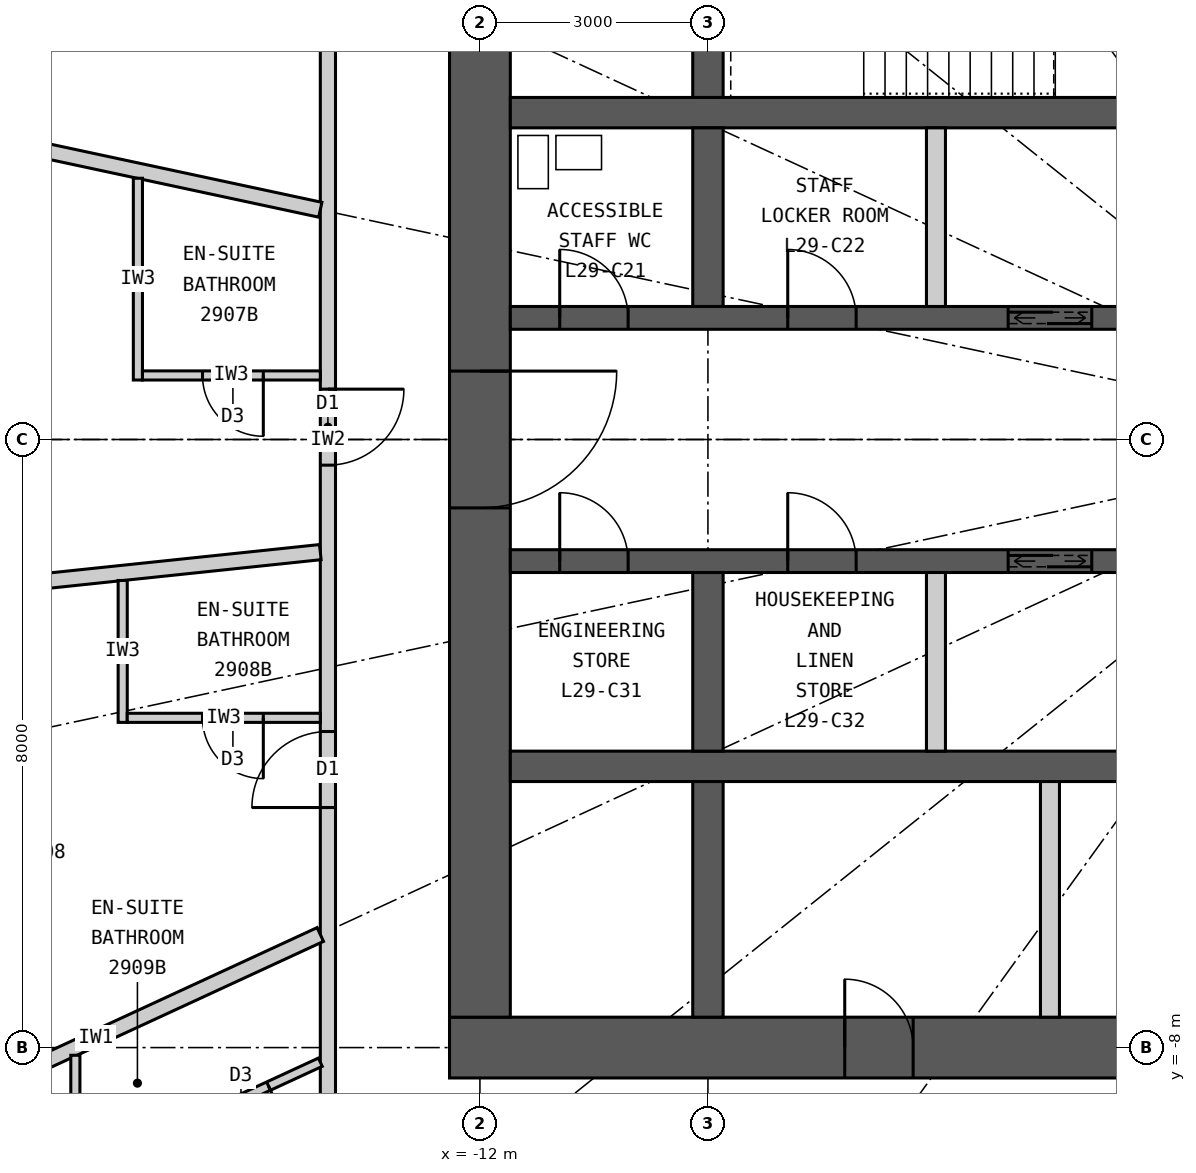
"""IFC4 building model, lengths in metres.
Left out: names, types, materials, properties, quantities, classifications, styles, units other than length and angle.
Written with IfcOpenShell. Run it as: python <this file> out.ifc"""

import sys

from ifc_helpers import new_model, si_unit, direction, frame, frame_2d, origin, place, context, subcontext, project, spatial, rectangle, extrude, element, fill, save


model = new_model("IFC4")
c1 = context("Model", 3, precision=1e-05, world=origin(), true_north=direction((0.0, 1.0)))
c2 = subcontext(c1, "Body", "Model", "MODEL_VIEW")
j1 = project(units=[si_unit("LENGTHUNIT", "METRE"), si_unit("PLANEANGLEUNIT", "RADIAN")], contexts=[c1])
p1 = place(None, origin())
s1 = spatial("IfcSite", under=j1, at=p1, CompositionType="ELEMENT")
p2 = place(p1, origin())
s2 = spatial("IfcBuilding", under=s1, at=p2, CompositionType="ELEMENT")
p3 = place(p2, frame((0.0, 0.0, 115.5)))
s3 = spatial("IfcBuildingStorey", under=s2, at=p3, CompositionType="ELEMENT", Elevation=115.5)
p4 = place(p3, frame((12.4, -8.0, 0.0), z_axis=(0.0, 0.0, 1.0), x_axis=(-1.0, 0.0, 0.0)))
e1 = element("IfcWall", 1, at=p4, inside=s3, PredefinedType="SHEAR", context=c2, shape_type="SweptSolid", body=[
    extrude(rectangle(XDim=24.8, YDim=0.8, at=frame_2d((12.4, 0.0))), origin(), (0.0, 0.0, 1.0), 3.3),
])
p5 = place(p4, frame((11.1, 0.0, 0.0)))
e2 = element("IfcOpeningElement", 2, at=p5, cuts=e1, PredefinedType="OPENING", context=c2, shape_type="SweptSolid", body=[
    extrude(rectangle(XDim=1.2, YDim=2.2, at=frame_2d((0.6, 1.1))), frame((0.0, 0.41, 0.0), z_axis=(0.0, -1.0, 0.0), x_axis=(1.0, 0.0, 0.0)), (0.0, 0.0, 1.0), 0.82),
])
p6 = place(p4, frame((18.7, 0.0, 0.0)))
e3 = element("IfcOpeningElement", 3, at=p6, cuts=e1, PredefinedType="OPENING", context=c2, shape_type="SweptSolid", body=[
    extrude(rectangle(XDim=0.9, YDim=2.2, at=frame_2d((0.45, 1.1))), frame((0.0, 0.41, 0.0), z_axis=(0.0, -1.0, 0.0), x_axis=(1.0, 0.0, 0.0)), (0.0, 0.0, 1.0), 0.82),
])
p7 = place(p3, frame((-12.0, 7.6, 0.0), z_axis=(0.0, 0.0, 1.0), x_axis=(0.0, -1.0, 0.0)))
e4 = element("IfcWall", 4, at=p7, inside=s3, PredefinedType="SHEAR", context=c2, shape_type="SweptSolid", body=[
    extrude(rectangle(XDim=15.2, YDim=0.8, at=frame_2d((7.6, 0.0))), origin(), (0.0, 0.0, 1.0), 3.3),
])
p8 = place(p7, frame((6.7, 0.0, 0.0)))
e5 = element("IfcOpeningElement", 5, at=p8, cuts=e4, PredefinedType="OPENING", context=c2, shape_type="SweptSolid", body=[
    extrude(rectangle(XDim=1.8, YDim=2.2, at=frame_2d((0.9, 1.1))), frame((0.0, 0.41, 0.0), z_axis=(0.0, -1.0, 0.0), x_axis=(1.0, 0.0, 0.0)), (0.0, 0.0, 1.0), 0.82),
])
p9 = place(p3, frame((-11.6, 4.3, 0.0), z_axis=(0.0, 0.0, 1.0), x_axis=(1.0, 0.0, 0.0)))
e6 = element("IfcWall", 6, at=p9, inside=s3, PredefinedType="SHEAR", context=c2, shape_type="SweptSolid", body=[
    extrude(rectangle(XDim=23.2, YDim=0.4, at=frame_2d((11.6, 0.0))), origin(), (0.0, 0.0, 1.0), 3.3),
])
p10 = place(p3, frame((-11.6, 1.6, 0.0), z_axis=(0.0, 0.0, 1.0), x_axis=(1.0, 0.0, 0.0)))
e7 = element("IfcWall", 7, at=p10, inside=s3, PredefinedType="SHEAR", context=c2, shape_type="SweptSolid", body=[
    extrude(rectangle(XDim=23.2, YDim=0.3, at=frame_2d((11.6, 0.0))), origin(), (0.0, 0.0, 1.0), 3.3),
])
p11 = place(p10, frame((6.55, 0.0, 0.0)))
e8 = element("IfcOpeningElement", 8, at=p11, cuts=e7, PredefinedType="OPENING", context=c2, shape_type="SweptSolid", body=[
    extrude(rectangle(XDim=1.1, YDim=2.2, at=frame_2d((0.55, 1.1))), frame((0.0, 0.16, 0.0), z_axis=(0.0, -1.0, 0.0), x_axis=(1.0, 0.0, 0.0)), (0.0, 0.0, 1.0), 0.32),
])
p12 = place(p10, frame((0.65, 0.0, 0.0)))
e9 = element("IfcOpeningElement", 9, at=p12, cuts=e7, PredefinedType="OPENING", context=c2, shape_type="SweptSolid", body=[
    extrude(rectangle(XDim=0.9, YDim=2.2, at=frame_2d((0.45, 1.1))), frame((0.0, 0.16, 0.0), z_axis=(0.0, -1.0, 0.0), x_axis=(1.0, 0.0, 0.0)), (0.0, 0.0, 1.0), 0.32),
])
p13 = place(p10, frame((3.65, 0.0, 0.0)))
e10 = element("IfcOpeningElement", 10, at=p13, cuts=e7, PredefinedType="OPENING", context=c2, shape_type="SweptSolid", body=[
    extrude(rectangle(XDim=0.9, YDim=2.2, at=frame_2d((0.45, 1.1))), frame((0.0, 0.16, 0.0), z_axis=(0.0, -1.0, 0.0), x_axis=(1.0, 0.0, 0.0)), (0.0, 0.0, 1.0), 0.32),
])
p14 = place(p10, frame((21.65, 0.0, 0.0)))
e11 = element("IfcOpeningElement", 11, at=p14, cuts=e7, PredefinedType="OPENING", context=c2, shape_type="SweptSolid", body=[
    extrude(rectangle(XDim=0.9, YDim=2.2, at=frame_2d((0.45, 1.1))), frame((0.0, 0.16, 0.0), z_axis=(0.0, -1.0, 0.0), x_axis=(1.0, 0.0, 0.0)), (0.0, 0.0, 1.0), 0.32),
])
p15 = place(p3, frame((-11.6, -4.3, 0.0), z_axis=(0.0, 0.0, 1.0), x_axis=(1.0, 0.0, 0.0)))
e12 = element("IfcWall", 12, at=p15, inside=s3, PredefinedType="SHEAR", context=c2, shape_type="SweptSolid", body=[
    extrude(rectangle(XDim=23.2, YDim=0.4, at=frame_2d((11.6, 0.0))), origin(), (0.0, 0.0, 1.0), 3.3),
])
p16 = place(p3, frame((-11.6, -1.6, 0.0), z_axis=(0.0, 0.0, 1.0), x_axis=(1.0, 0.0, 0.0)))
e13 = element("IfcWall", 13, at=p16, inside=s3, PredefinedType="SHEAR", context=c2, shape_type="SweptSolid", body=[
    extrude(rectangle(XDim=23.2, YDim=0.3, at=frame_2d((11.6, 0.0))), origin(), (0.0, 0.0, 1.0), 3.3),
])
p17 = place(p16, frame((6.55, 0.0, 0.0)))
e14 = element("IfcOpeningElement", 14, at=p17, cuts=e13, PredefinedType="OPENING", context=c2, shape_type="SweptSolid", body=[
    extrude(rectangle(XDim=1.1, YDim=2.2, at=frame_2d((0.55, 1.1))), frame((0.0, 0.16, 0.0), z_axis=(0.0, -1.0, 0.0), x_axis=(1.0, 0.0, 0.0)), (0.0, 0.0, 1.0), 0.32),
])
p18 = place(p16, frame((15.3, 0.0, 0.0)))
e15 = element("IfcOpeningElement", 15, at=p18, cuts=e13, PredefinedType="OPENING", context=c2, shape_type="SweptSolid", body=[
    extrude(rectangle(XDim=1.6, YDim=2.4, at=frame_2d((0.8, 1.2))), frame((0.0, 0.16, 0.0), z_axis=(0.0, -1.0, 0.0), x_axis=(1.0, 0.0, 0.0)), (0.0, 0.0, 1.0), 0.32),
])
p19 = place(p16, frame((0.65, 0.0, 0.0)))
e16 = element("IfcOpeningElement", 16, at=p19, cuts=e13, PredefinedType="OPENING", context=c2, shape_type="SweptSolid", body=[
    extrude(rectangle(XDim=0.9, YDim=2.2, at=frame_2d((0.45, 1.1))), frame((0.0, 0.16, 0.0), z_axis=(0.0, -1.0, 0.0), x_axis=(1.0, 0.0, 0.0)), (0.0, 0.0, 1.0), 0.32),
])
p20 = place(p16, frame((3.65, 0.0, 0.0)))
e17 = element("IfcOpeningElement", 17, at=p20, cuts=e13, PredefinedType="OPENING", context=c2, shape_type="SweptSolid", body=[
    extrude(rectangle(XDim=0.9, YDim=2.2, at=frame_2d((0.45, 1.1))), frame((0.0, 0.16, 0.0), z_axis=(0.0, -1.0, 0.0), x_axis=(1.0, 0.0, 0.0)), (0.0, 0.0, 1.0), 0.32),
])
p21 = place(p16, frame((21.65, 0.0, 0.0)))
e18 = element("IfcOpeningElement", 18, at=p21, cuts=e13, PredefinedType="OPENING", context=c2, shape_type="SweptSolid", body=[
    extrude(rectangle(XDim=0.9, YDim=2.2, at=frame_2d((0.45, 1.1))), frame((0.0, 0.16, 0.0), z_axis=(0.0, -1.0, 0.0), x_axis=(1.0, 0.0, 0.0)), (0.0, 0.0, 1.0), 0.32),
])
p22 = place(p3, frame((-9.0, 4.5, 0.0), z_axis=(0.0, 0.0, 1.0), x_axis=(0.0, 1.0, 0.0)))
e19 = element("IfcWall", 19, at=p22, inside=s3, PredefinedType="SHEAR", context=c2, shape_type="SweptSolid", body=[
    extrude(rectangle(XDim=3.1, YDim=0.4, at=frame_2d((1.55, 0.0))), origin(), (0.0, 0.0, 1.0), 3.3),
])
for number, where, z_axis, x_axis in (
    (20, (-9.0, 1.75, 0.0), (0.0, 0.0, 1.0), (0.0, 1.0, 0.0)),
    (21, (-9.0, -4.1, 0.0), (0.0, 0.0, 1.0), (0.0, 1.0, 0.0)),
):
    element("IfcWall", number, at=place(p3, frame(where, z_axis=z_axis, x_axis=x_axis)), inside=s3, PredefinedType="SHEAR", context=c2, shape_type="SweptSolid", body=[
        extrude(rectangle(XDim=2.35, YDim=0.4, at=frame_2d((1.175, 0.0))), origin(), (0.0, 0.0, 1.0), 3.3),
    ])
p23 = place(p3, frame((-9.0, -7.6, 0.0), z_axis=(0.0, 0.0, 1.0), x_axis=(0.0, 1.0, 0.0)))
e22 = element("IfcWall", 22, at=p23, inside=s3, PredefinedType="SHEAR", context=c2, shape_type="SweptSolid", body=[
    extrude(rectangle(XDim=3.1, YDim=0.4, at=frame_2d((1.55, 0.0))), origin(), (0.0, 0.0, 1.0), 3.3),
])
p24 = place(p3, frame((-4.5, -7.6, 0.0), z_axis=(0.0, 0.0, 1.0), x_axis=(0.0, 1.0, 0.0)))
e23 = element("IfcWall", 23, at=p24, inside=s3, PredefinedType="PARTITIONING", context=c2, shape_type="SweptSolid", body=[
    extrude(rectangle(XDim=3.1, YDim=0.25, at=frame_2d((1.55, 0.0))), origin(), (0.0, 0.0, 1.0), 3.3),
])
for number, where, z_axis, x_axis in (
    (24, (-6.0, 1.75, 0.0), (0.0, 0.0, 1.0), (0.0, 1.0, 0.0)),
    (25, (-6.0, -4.1, 0.0), (0.0, 0.0, 1.0), (0.0, 1.0, 0.0)),
):
    element("IfcWall", number, at=place(p3, frame(where, z_axis=z_axis, x_axis=x_axis)), inside=s3, PredefinedType="PARTITIONING", context=c2, shape_type="SweptSolid", body=[
        extrude(rectangle(XDim=2.35, YDim=0.25, at=frame_2d((1.175, 0.0))), origin(), (0.0, 0.0, 1.0), 3.3),
    ])
p25 = place(p3, frame((-14.0, 9.9, 0.0), z_axis=(0.0, 0.0, 1.0), x_axis=(0.0, -1.0, 0.0)))
e26 = element("IfcWall", 26, at=p25, inside=s3, PredefinedType="PARTITIONING", context=c2, shape_type="SweptSolid", body=[
    extrude(rectangle(XDim=19.8, YDim=0.2, at=frame_2d((9.9, 0.0))), origin(), (0.0, 0.0, 1.0), 3.12),
])
p26 = place(p25, frame((3.622, 0.0, 0.0)))
e27 = element("IfcOpeningElement", 27, at=p26, cuts=e26, PredefinedType="OPENING", context=c2, shape_type="SweptSolid", body=[
    extrude(rectangle(XDim=1.0, YDim=2.2, at=frame_2d((0.5, 1.1))), frame((0.0, 0.11, 0.0), z_axis=(0.0, -1.0, 0.0), x_axis=(1.0, 0.0, 0.0)), (0.0, 0.0, 1.0), 0.22),
])
p27 = place(p25, frame((9.238, 0.0, 0.0)))
e28 = element("IfcOpeningElement", 28, at=p27, cuts=e26, PredefinedType="OPENING", context=c2, shape_type="SweptSolid", body=[
    extrude(rectangle(XDim=1.0, YDim=2.2, at=frame_2d((0.5, 1.1))), frame((0.0, 0.11, 0.0), z_axis=(0.0, -1.0, 0.0), x_axis=(1.0, 0.0, 0.0)), (0.0, 0.0, 1.0), 0.22),
])
p28 = place(p25, frame((13.742, 0.0, 0.0)))
e29 = element("IfcOpeningElement", 29, at=p28, cuts=e26, PredefinedType="OPENING", context=c2, shape_type="SweptSolid", body=[
    extrude(rectangle(XDim=1.0, YDim=2.2, at=frame_2d((0.5, 1.1))), frame((0.0, 0.11, 0.0), z_axis=(0.0, -1.0, 0.0), x_axis=(1.0, 0.0, 0.0)), (0.0, 0.0, 1.0), 0.22),
])
p29 = place(p25, frame((18.698, 0.0, 0.0)))
e30 = element("IfcOpeningElement", 30, at=p29, cuts=e26, PredefinedType="OPENING", context=c2, shape_type="SweptSolid", body=[
    extrude(rectangle(XDim=1.0, YDim=2.2, at=frame_2d((0.5, 1.1))), frame((0.0, 0.11, 0.0), z_axis=(0.0, -1.0, 0.0), x_axis=(1.0, 0.0, 0.0)), (0.0, 0.0, 1.0), 0.22),
])
p30 = place(p3, frame((-14.1, 3.022, 0.0), z_axis=(0.0, 0.0, 1.0), x_axis=(-0.977783513367, 0.209617272638, 0.0)))
e31 = element("IfcWall", 31, at=p30, inside=s3, PredefinedType="PARTITIONING", context=c2, shape_type="SweptSolid", body=[
    extrude(rectangle(XDim=8.508, YDim=0.2, at=frame_2d((4.254, 0.0))), origin(), (0.0, 0.0, 1.0), 2.37),
])
p31 = place(p3, frame((-14.1, -1.482, 0.0), z_axis=(0.0, 0.0, 1.0), x_axis=(-0.994523202615, -0.104516024894, 0.0)))
e32 = element("IfcWall", 32, at=p31, inside=s3, PredefinedType="PARTITIONING", context=c2, shape_type="SweptSolid", body=[
    extrude(rectangle(XDim=10.091, YDim=0.2, at=frame_2d((5.045, 0.0))), origin(), (0.0, 0.0, 1.0), 2.47),
])
p32 = place(p3, frame((-14.1, -6.512, 0.0), z_axis=(0.0, 0.0, 1.0), x_axis=(-0.907833019998, -0.419331858797, 0.0)))
e33 = element("IfcWall", 33, at=p32, inside=s3, PredefinedType="PARTITIONING", context=c2, shape_type="SweptSolid", body=[
    extrude(rectangle(XDim=6.505, YDim=0.2, at=frame_2d((3.252, 0.0))), origin(), (0.0, 0.0, 1.0), 2.27),
])
p33 = place(p3, frame((-16.5, 3.437, 0.0), z_axis=(0.0, 0.0, 1.0), x_axis=(0.0, -1.0, 0.0)))
e34 = element("IfcWall", 34, at=p33, inside=s3, PredefinedType="PARTITIONING", context=c2, shape_type="SweptSolid", body=[
    extrude(rectangle(XDim=2.655, YDim=0.12, at=frame_2d((1.327, 0.0))), origin(), (0.0, 0.0, 1.0), 3.12),
])
p34 = place(p3, frame((-14.1, 0.843, 0.0), z_axis=(0.0, 0.0, 1.0), x_axis=(-1.0, 0.0, 0.0)))
e35 = element("IfcWall", 35, at=p34, inside=s3, PredefinedType="PARTITIONING", context=c2, shape_type="SweptSolid", body=[
    extrude(rectangle(XDim=2.34, YDim=0.12, at=frame_2d((1.17, 0.0))), origin(), (0.0, 0.0, 1.0), 3.12),
])
p35 = place(p34, frame((0.75, 0.0, 0.0)))
e36 = element("IfcOpeningElement", 36, at=p35, cuts=e35, PredefinedType="OPENING", context=c2, shape_type="SweptSolid", body=[
    extrude(rectangle(XDim=0.8, YDim=2.1, at=frame_2d((0.4, 1.05))), frame((0.0, 0.07, 0.0), z_axis=(0.0, -1.0, 0.0), x_axis=(1.0, 0.0, 0.0)), (0.0, 0.0, 1.0), 0.14),
])
p36 = place(p3, frame((-16.7, -1.855, 0.0), z_axis=(0.0, 0.0, 1.0), x_axis=(0.0, -1.0, 0.0)))
e37 = element("IfcWall", 37, at=p36, inside=s3, PredefinedType="PARTITIONING", context=c2, shape_type="SweptSolid", body=[
    extrude(rectangle(XDim=1.867, YDim=0.12, at=frame_2d((0.933, 0.0))), origin(), (0.0, 0.0, 1.0), 3.12),
])
p37 = place(p3, frame((-14.1, -3.662, 0.0), z_axis=(0.0, 0.0, 1.0), x_axis=(-1.0, 0.0, 0.0)))
e38 = element("IfcWall", 38, at=p37, inside=s3, PredefinedType="PARTITIONING", context=c2, shape_type="SweptSolid", body=[
    extrude(rectangle(XDim=2.54, YDim=0.12, at=frame_2d((1.27, 0.0))), origin(), (0.0, 0.0, 1.0), 2.37),
])
p38 = place(p37, frame((0.75, 0.0, 0.0)))
e39 = element("IfcOpeningElement", 39, at=p38, cuts=e38, PredefinedType="OPENING", context=c2, shape_type="SweptSolid", body=[
    extrude(rectangle(XDim=0.8, YDim=2.1, at=frame_2d((0.4, 1.05))), frame((0.0, 0.07, 0.0), z_axis=(0.0, -1.0, 0.0), x_axis=(1.0, 0.0, 0.0)), (0.0, 0.0, 1.0), 0.14),
])
p39 = place(p3, frame((-17.323, -8.101, 0.0), z_axis=(0.0, 0.0, 1.0), x_axis=(0.0, -1.0, 0.0)))
e40 = element("IfcWall", 40, at=p39, inside=s3, PredefinedType="PARTITIONING", context=c2, shape_type="SweptSolid", body=[
    extrude(rectangle(XDim=1.64, YDim=0.12, at=frame_2d((0.82, 0.0))), origin(), (0.0, 0.0, 1.0), 3.12),
])
p40 = place(p3, frame((-14.1, -8.193, 0.0), z_axis=(0.0, 0.0, 1.0), x_axis=(-0.907836493557, -0.419324338628, 0.0)))
e41 = element("IfcWall", 41, at=p40, inside=s3, PredefinedType="PARTITIONING", context=c2, shape_type="SweptSolid", body=[
    extrude(rectangle(XDim=3.49, YDim=0.12, at=frame_2d((1.745, 0.0))), origin(), (0.0, 0.0, 1.0), 3.12),
])
p41 = place(p40, frame((0.75, 0.0, 0.0)))
e42 = element("IfcOpeningElement", 42, at=p41, cuts=e41, PredefinedType="OPENING", context=c2, shape_type="SweptSolid", body=[
    extrude(rectangle(XDim=0.8, YDim=2.1, at=frame_2d((0.4, 1.05))), frame((0.0, 0.07, 0.0), z_axis=(0.0, -1.0, 0.0), x_axis=(1.0, 0.0, 0.0)), (0.0, 0.0, 1.0), 0.14),
])
p42 = place(p35, origin())
e43 = element("IfcDoor", 43, at=p42, inside=s3, OperationType="SINGLE_SWING_LEFT", PredefinedType="DOOR", context=c2, shape_type="SweptSolid", body=[
    extrude(rectangle(XDim=0.8, YDim=2.1, at=frame_2d((0.4, 1.05))), frame((0.0, 0.025, 0.0), z_axis=(0.0, -1.0, 0.0), x_axis=(1.0, 0.0, 0.0)), (0.0, 0.0, 1.0), 0.05),
])
fill(e36, e43)
p43 = place(p27, origin())
e44 = element("IfcDoor", 44, at=p43, inside=s3, OperationType="SINGLE_SWING_LEFT", PredefinedType="DOOR", context=c2, shape_type="SweptSolid", body=[
    extrude(rectangle(XDim=1.0, YDim=2.2, at=frame_2d((0.5, 1.1))), frame((0.0, 0.025, 0.0), z_axis=(0.0, -1.0, 0.0), x_axis=(1.0, 0.0, 0.0)), (0.0, 0.0, 1.0), 0.05),
])
fill(e28, e44)
p44 = place(p38, origin())
e45 = element("IfcDoor", 45, at=p44, inside=s3, OperationType="SINGLE_SWING_LEFT", PredefinedType="DOOR", context=c2, shape_type="SweptSolid", body=[
    extrude(rectangle(XDim=0.8, YDim=2.1, at=frame_2d((0.4, 1.05))), frame((0.0, 0.025, 0.0), z_axis=(0.0, -1.0, 0.0), x_axis=(1.0, 0.0, 0.0)), (0.0, 0.0, 1.0), 0.05),
])
fill(e39, e45)
p45 = place(p28, origin())
e46 = element("IfcDoor", 46, at=p45, inside=s3, OperationType="SINGLE_SWING_RIGHT", PredefinedType="DOOR", context=c2, shape_type="SweptSolid", body=[
    extrude(rectangle(XDim=1.0, YDim=2.2, at=frame_2d((0.5, 1.1))), frame((0.0, 0.025, 0.0), z_axis=(0.0, -1.0, 0.0), x_axis=(1.0, 0.0, 0.0)), (0.0, 0.0, 1.0), 0.05),
])
fill(e29, e46)
p46 = place(p41, origin())
e47 = element("IfcDoor", 47, at=p46, inside=s3, OperationType="SINGLE_SWING_LEFT", PredefinedType="DOOR", context=c2, shape_type="SweptSolid", body=[
    extrude(rectangle(XDim=0.8, YDim=2.1, at=frame_2d((0.4, 1.05))), frame((0.0, 0.025, 0.0), z_axis=(0.0, -1.0, 0.0), x_axis=(1.0, 0.0, 0.0)), (0.0, 0.0, 1.0), 0.05),
])
fill(e42, e47)
p47 = place(p6, origin())
e48 = element("IfcDoor", 48, at=p47, inside=s3, OperationType="SINGLE_SWING_RIGHT", PredefinedType="DOOR", context=c2, shape_type="SweptSolid", body=[
    extrude(rectangle(XDim=0.9, YDim=2.2, at=frame_2d((0.45, 1.1))), frame((0.0, 0.025, 0.0), z_axis=(0.0, -1.0, 0.0), x_axis=(1.0, 0.0, 0.0)), (0.0, 0.0, 1.0), 0.05),
])
fill(e3, e48)
p48 = place(p11, origin())
e49 = element("IfcDoor", 49, at=p48, inside=s3, OperationType="DOUBLE_DOOR_SLIDING", PredefinedType="DOOR", context=c2, shape_type="SweptSolid", body=[
    extrude(rectangle(XDim=1.1, YDim=2.2, at=frame_2d((0.55, 1.1))), frame((0.0, 0.025, 0.0), z_axis=(0.0, -1.0, 0.0), x_axis=(1.0, 0.0, 0.0)), (0.0, 0.0, 1.0), 0.05),
])
fill(e8, e49)
p49 = place(p17, origin())
e50 = element("IfcDoor", 50, at=p49, inside=s3, OperationType="DOUBLE_DOOR_SLIDING", PredefinedType="DOOR", context=c2, shape_type="SweptSolid", body=[
    extrude(rectangle(XDim=1.1, YDim=2.2, at=frame_2d((0.55, 1.1))), frame((0.0, 0.025, 0.0), z_axis=(0.0, -1.0, 0.0), x_axis=(1.0, 0.0, 0.0)), (0.0, 0.0, 1.0), 0.05),
])
fill(e14, e50)
p50 = place(p12, origin())
e51 = element("IfcDoor", 51, at=p50, inside=s3, OperationType="SINGLE_SWING_LEFT", PredefinedType="DOOR", context=c2, shape_type="SweptSolid", body=[
    extrude(rectangle(XDim=0.9, YDim=2.2, at=frame_2d((0.45, 1.1))), frame((0.0, 0.025, 0.0), z_axis=(0.0, -1.0, 0.0), x_axis=(1.0, 0.0, 0.0)), (0.0, 0.0, 1.0), 0.05),
])
fill(e9, e51)
p51 = place(p13, origin())
e52 = element("IfcDoor", 52, at=p51, inside=s3, OperationType="SINGLE_SWING_LEFT", PredefinedType="DOOR", context=c2, shape_type="SweptSolid", body=[
    extrude(rectangle(XDim=0.9, YDim=2.2, at=frame_2d((0.45, 1.1))), frame((0.0, 0.025, 0.0), z_axis=(0.0, -1.0, 0.0), x_axis=(1.0, 0.0, 0.0)), (0.0, 0.0, 1.0), 0.05),
])
fill(e10, e52)
p52 = place(p19, origin())
e53 = element("IfcDoor", 53, at=p52, inside=s3, OperationType="SINGLE_SWING_LEFT", PredefinedType="DOOR", context=c2, shape_type="SweptSolid", body=[
    extrude(rectangle(XDim=0.9, YDim=2.2, at=frame_2d((0.45, 1.1))), frame((0.0, 0.025, 0.0), z_axis=(0.0, -1.0, 0.0), x_axis=(1.0, 0.0, 0.0)), (0.0, 0.0, 1.0), 0.05),
])
fill(e16, e53)
p53 = place(p20, origin())
e54 = element("IfcDoor", 54, at=p53, inside=s3, OperationType="SINGLE_SWING_LEFT", PredefinedType="DOOR", context=c2, shape_type="SweptSolid", body=[
    extrude(rectangle(XDim=0.9, YDim=2.2, at=frame_2d((0.45, 1.1))), frame((0.0, 0.025, 0.0), z_axis=(0.0, -1.0, 0.0), x_axis=(1.0, 0.0, 0.0)), (0.0, 0.0, 1.0), 0.05),
])
fill(e17, e54)
p54 = place(p8, origin())
e55 = element("IfcDoor", 55, at=p54, inside=s3, OperationType="DOUBLE_DOOR_DOUBLE_SWING", PredefinedType="DOOR", context=c2, shape_type="SweptSolid", body=[
    extrude(rectangle(XDim=1.8, YDim=2.2, at=frame_2d((0.9, 1.1))), frame((0.0, 0.025, 0.0), z_axis=(0.0, -1.0, 0.0), x_axis=(1.0, 0.0, 0.0)), (0.0, 0.0, 1.0), 0.05),
])
fill(e5, e55)
save(model, sys.argv[1])
